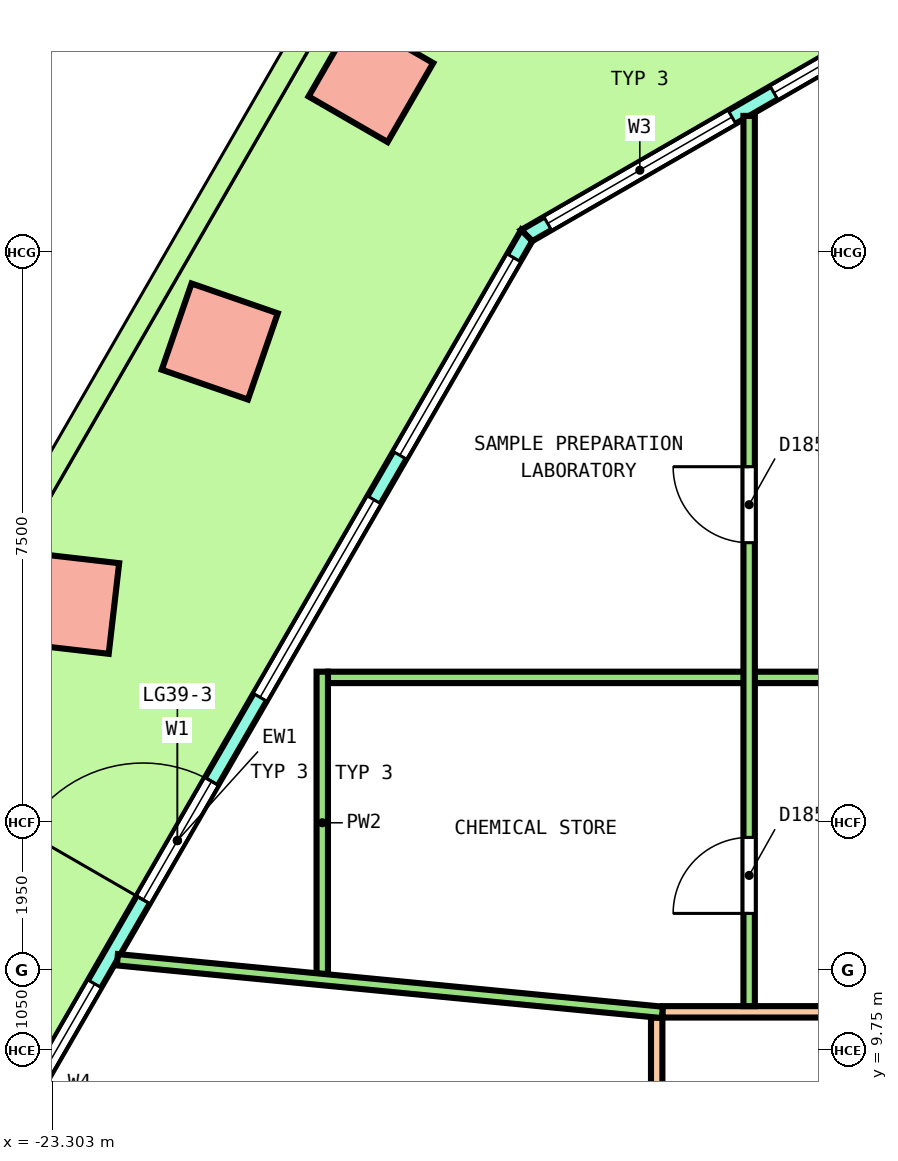
"""IFC4 building model, lengths in metres.
Left out: names, types, materials, properties, quantities, classifications, styles, units other than length and angle.
Written with IfcOpenShell. Run it as: python <this file> out.ifc"""

import sys

from ifc_helpers import new_model, si_unit, direction, frame, frame_2d, origin, origin_2d, place, context, subcontext, project, spatial, polyline, rectangle, outline, extrude, element, fill, save


model = new_model("IFC4")
c1 = context("Model", 3, precision=1e-05, world=origin(), true_north=direction((0.0, 1.0)))
c2 = subcontext(c1, "Body", "Model", "MODEL_VIEW")
j1 = project(units=[si_unit("LENGTHUNIT", "METRE"), si_unit("PLANEANGLEUNIT", "RADIAN")], contexts=[c1])
p1 = place(None, origin())
s1 = spatial("IfcSite", under=j1, at=p1, CompositionType="ELEMENT")
p2 = place(p1, origin())
s2 = spatial("IfcBuilding", under=s1, at=p2, CompositionType="ELEMENT")
p3 = place(p2, frame((0.0, 0.0, 180.4)))
s3 = spatial("IfcBuildingStorey", under=s2, at=p3, CompositionType="ELEMENT", Elevation=180.4)
p4 = place(p3, frame((-19.11, 22.512, 0.0), z_axis=(-0.036205074038, 0.0, 0.999344381389), x_axis=(-0.499425957592, -0.866167613071, -0.018093616283)))
e1 = element("IfcColumn", 1, at=p4, inside=s3, PredefinedType="COLUMN", context=c2, shape_type="SweptSolid", body=[
    extrude(rectangle(XDim=1.2, YDim=1.2, at=origin_2d()), origin(), (0.0, 0.0, 1.0), 4.053),
])
p5 = place(p3, frame((-21.098, 19.069, 0.0), z_axis=(-0.032654174822, 0.006325993277, 0.999446690262), x_axis=(-0.500478631698, -0.865680616164, -0.010872442804)))
e2 = element("IfcColumn", 2, at=p5, inside=s3, PredefinedType="COLUMN", context=c2, shape_type="SweptSolid", body=[
    extrude(rectangle(XDim=1.2, YDim=1.2, at=origin_2d()), origin(), (0.0, 0.0, 1.0), 4.052),
])
p6 = place(p3, frame((-23.087, 15.625, 0.0), z_axis=(-0.028980660531, 0.012532177527, 0.999501408624), x_axis=(-0.499450496938, -0.866334867635, -0.003619147421)))
e3 = element("IfcColumn", 3, at=p6, inside=s3, PredefinedType="COLUMN", context=c2, shape_type="SweptSolid", body=[
    extrude(rectangle(XDim=1.2, YDim=1.2, at=origin_2d()), origin(), (0.0, 0.0, 1.0), 4.052),
])
p7 = place(p3, frame((-11.107, 23.9, 0.0), z_axis=(0.0, 0.0, 1.0), x_axis=(-0.866029458321, -0.49999297727, 0.0)))
e4 = element("IfcWall", 4, at=p7, inside=s3, PredefinedType="SOLIDWALL", context=c2, shape_type="SweptSolid", body=[
    extrude(outline(polyline([(-0.027, -0.1), (1.128, -0.1), (2.282, -0.1), (3.437, -0.1), (4.592, -0.1), (5.747, -0.1), (6.901, -0.1), (6.848, 0.1), (5.711, 0.1), (4.574, 0.1), (3.437, 0.1), (2.301, 0.1), (1.164, 0.1), (0.027, 0.1), (-0.027, -0.1)])), origin(), (0.0, 0.0, 1.0), 4.1),
])
p8 = place(p7, frame((0.319, 0.0, 0.1)))
e5 = element("IfcOpeningElement", 5, at=p8, cuts=e4, PredefinedType="OPENING", context=c2, shape_type="SweptSolid", body=[
    extrude(rectangle(XDim=2.8, YDim=2.9, at=frame_2d((1.4, 1.45))), frame((0.0, 0.11, 0.0), z_axis=(0.0, -1.0, 0.0), x_axis=(1.0, 0.0, 0.0)), (0.0, 0.0, 1.0), 0.22),
])
p9 = place(p7, frame((3.756, 0.0, 0.1)))
e6 = element("IfcOpeningElement", 6, at=p9, cuts=e4, PredefinedType="OPENING", context=c2, shape_type="SweptSolid", body=[
    extrude(rectangle(XDim=2.8, YDim=2.9, at=frame_2d((1.4, 1.45))), frame((0.0, 0.11, 0.0), z_axis=(0.0, -1.0, 0.0), x_axis=(1.0, 0.0, 0.0)), (0.0, 0.0, 1.0), 0.22),
])
p10 = place(p3, frame((-17.061, 20.463, 0.0), z_axis=(0.0, 0.0, 1.0), x_axis=(-0.499998761798, -0.866026118659, 0.0)))
e7 = element("IfcWall", 7, at=p10, inside=s3, PredefinedType="SOLIDWALL", context=c2, shape_type="SweptSolid", body=[
    extrude(outline(polyline([(-0.027, -0.1), (0.997, -0.1), (2.021, -0.1), (3.046, -0.1), (4.07, -0.1), (5.094, -0.1), (6.118, -0.1), (7.143, -0.1), (8.167, -0.1), (9.191, -0.1), (10.215, -0.1), (11.239, -0.1), (12.263, -0.1), (13.288, -0.1), (14.312, -0.1), (15.336, -0.1), (16.36, -0.1), (17.385, -0.1), (18.409, -0.1), (18.355, 0.1), (17.337, 0.1), (16.319, 0.1), (15.3, 0.1), (14.282, 0.1), (13.264, 0.1), (12.246, 0.1), (11.227, 0.1), (10.209, 0.1), (9.191, 0.1), (8.173, 0.1), (7.155, 0.1), (6.136, 0.1), (5.118, 0.1), (4.1, 0.1), (3.082, 0.1), (2.063, 0.1), (1.045, 0.1), (0.027, 0.1), (-0.027, -0.1)])), origin(), (0.0, 0.0, 1.0), 4.1),
])
p11 = place(p10, frame((0.338, 0.0, 0.1)))
e8 = element("IfcOpeningElement", 8, at=p11, cuts=e7, PredefinedType="OPENING", context=c2, shape_type="SweptSolid", body=[
    extrude(rectangle(XDim=3.0, YDim=2.9, at=frame_2d((1.5, 1.45))), frame((0.0, 0.11, 0.0), z_axis=(0.0, -1.0, 0.0), x_axis=(1.0, 0.0, 0.0)), (0.0, 0.0, 1.0), 0.22),
])
p12 = place(p10, frame((4.015, 0.0, 0.1)))
e9 = element("IfcOpeningElement", 9, at=p12, cuts=e7, PredefinedType="OPENING", context=c2, shape_type="SweptSolid", body=[
    extrude(rectangle(XDim=3.0, YDim=2.9, at=frame_2d((1.5, 1.45))), frame((0.0, 0.11, 0.0), z_axis=(0.0, -1.0, 0.0), x_axis=(1.0, 0.0, 0.0)), (0.0, 0.0, 1.0), 0.22),
])
p13 = place(p10, frame((8.291, 0.0, 0.0)))
e10 = element("IfcOpeningElement", 10, at=p13, cuts=e7, PredefinedType="OPENING", context=c2, shape_type="SweptSolid", body=[
    extrude(rectangle(XDim=1.8, YDim=2.4, at=frame_2d((0.9, 1.2))), frame((0.0, 0.11, 0.0), z_axis=(0.0, -1.0, 0.0), x_axis=(1.0, 0.0, 0.0)), (0.0, 0.0, 1.0), 0.22),
])
p14 = place(p10, frame((8.291, 0.0, 2.55)))
e11 = element("IfcOpeningElement", 11, at=p14, cuts=e7, PredefinedType="OPENING", context=c2, shape_type="SweptSolid", body=[
    extrude(rectangle(XDim=1.8, YDim=0.45, at=frame_2d((0.9, 0.225))), frame((0.0, 0.11, 0.0), z_axis=(0.0, -1.0, 0.0), x_axis=(1.0, 0.0, 0.0)), (0.0, 0.0, 1.0), 0.22),
])
p15 = place(p10, frame((11.367, 0.0, 0.1)))
e12 = element("IfcOpeningElement", 12, at=p15, cuts=e7, PredefinedType="OPENING", context=c2, shape_type="SweptSolid", body=[
    extrude(rectangle(XDim=3.0, YDim=2.9, at=frame_2d((1.5, 1.45))), frame((0.0, 0.11, 0.0), z_axis=(0.0, -1.0, 0.0), x_axis=(1.0, 0.0, 0.0)), (0.0, 0.0, 1.0), 0.22),
])
p16 = place(p10, frame((15.044, 0.0, 0.1)))
e13 = element("IfcOpeningElement", 13, at=p16, cuts=e7, PredefinedType="OPENING", context=c2, shape_type="SweptSolid", body=[
    extrude(rectangle(XDim=3.0, YDim=2.9, at=frame_2d((1.5, 1.45))), frame((0.0, 0.11, 0.0), z_axis=(0.0, -1.0, 0.0), x_axis=(1.0, 0.0, 0.0)), (0.0, 0.0, 1.0), 0.22),
])
p17 = place(p3, frame((-15.275, 10.25, 0.0), z_axis=(0.0, 0.0, 1.0), x_axis=(1.0, 0.0, 0.0)))
e14 = element("IfcWall", 14, at=p17, inside=s3, PredefinedType="PARTITIONING", context=c2, shape_type="SweptSolid", body=[
    extrude(rectangle(XDim=30.55, YDim=0.15, at=frame_2d((15.275, 0.0))), origin(), (0.0, 0.0, 1.0), 3.05),
])
p18 = place(p17, frame((26.836, 0.0, 0.0)))
e15 = element("IfcOpeningElement", 15, at=p18, cuts=e14, PredefinedType="OPENING", context=c2, shape_type="SweptSolid", body=[
    extrude(rectangle(XDim=1.0, YDim=2.1, at=frame_2d((0.5, 1.05))), frame((0.0, 0.085, 0.0), z_axis=(0.0, -1.0, 0.0), x_axis=(1.0, 0.0, 0.0)), (0.0, 0.0, 1.0), 0.17),
])
p19 = place(p17, frame((13.785, 0.0, 0.0)))
e16 = element("IfcOpeningElement", 16, at=p19, cuts=e14, PredefinedType="OPENING", context=c2, shape_type="SweptSolid", body=[
    extrude(rectangle(XDim=1.2, YDim=2.1, at=frame_2d((0.6, 1.05))), frame((0.0, 0.085, 0.0), z_axis=(0.0, -1.0, 0.0), x_axis=(1.0, 0.0, 0.0)), (0.0, 0.0, 1.0), 0.17),
])
p20 = place(p3, frame((-15.35, 0.399, 0.0), z_axis=(0.0, 0.0, 1.0), x_axis=(0.0, 1.0, 0.0)))
e17 = element("IfcWall", 17, at=p20, inside=s3, PredefinedType="PARTITIONING", context=c2, shape_type="SweptSolid", body=[
    extrude(rectangle(XDim=9.776, YDim=0.15, at=frame_2d((4.888, 0.0))), origin(), (0.0, 0.0, 1.0), 3.05),
])
p21 = place(p3, frame((-19.675, 14.65, 0.0), z_axis=(0.0, 0.0, 1.0), x_axis=(1.0, 0.0, 0.0)))
e18 = element("IfcWall", 18, at=p21, inside=s3, PredefinedType="PARTITIONING", context=c2, shape_type="SweptSolid", body=[
    extrude(rectangle(XDim=39.5, YDim=0.15, at=frame_2d((19.75, 0.0))), origin(), (0.0, 0.0, 1.0), 3.05),
])
p22 = place(p21, frame((30.472, 0.0, 0.0)))
e19 = element("IfcOpeningElement", 19, at=p22, cuts=e18, PredefinedType="OPENING", context=c2, shape_type="SweptSolid", body=[
    extrude(rectangle(XDim=1.2, YDim=2.1, at=frame_2d((0.6, 1.05))), frame((0.0, 0.085, 0.0), z_axis=(0.0, -1.0, 0.0), x_axis=(1.0, 0.0, 0.0)), (0.0, 0.0, 1.0), 0.17),
])
p23 = place(p3, frame((-14.134, 10.325, 0.0), z_axis=(0.0, 0.0, 1.0), x_axis=(0.0, 1.0, 0.0)))
e20 = element("IfcWall", 20, at=p23, inside=s3, PredefinedType="PARTITIONING", context=c2, shape_type="SweptSolid", body=[
    extrude(rectangle(XDim=11.712, YDim=0.15, at=frame_2d((5.856, 0.0))), origin(), (0.0, 0.0, 1.0), 3.05),
])
p24 = place(p23, frame((6.097, 0.0, 0.0)))
e21 = element("IfcOpeningElement", 21, at=p24, cuts=e20, PredefinedType="OPENING", context=c2, shape_type="SweptSolid", body=[
    extrude(rectangle(XDim=1.0, YDim=2.1, at=frame_2d((0.5, 1.05))), frame((0.0, 0.085, 0.0), z_axis=(0.0, -1.0, 0.0), x_axis=(1.0, 0.0, 0.0)), (0.0, 0.0, 1.0), 0.17),
])
p25 = place(p23, frame((1.22, 0.0, 0.0)))
e22 = element("IfcOpeningElement", 22, at=p25, cuts=e20, PredefinedType="OPENING", context=c2, shape_type="SweptSolid", body=[
    extrude(rectangle(XDim=1.0, YDim=2.1, at=frame_2d((0.5, 1.05))), frame((0.0, 0.085, 0.0), z_axis=(0.0, -1.0, 0.0), x_axis=(1.0, 0.0, 0.0)), (0.0, 0.0, 1.0), 0.17),
])
p26 = place(p3, frame((-19.75, 10.75, 0.0), z_axis=(0.0, 0.0, 1.0), x_axis=(0.0, 1.0, 0.0)))
e23 = element("IfcWall", 23, at=p26, inside=s3, PredefinedType="PARTITIONING", context=c2, shape_type="SweptSolid", body=[
    extrude(rectangle(XDim=3.975, YDim=0.15, at=frame_2d((1.988, 0.0))), origin(), (0.0, 0.0, 1.0), 3.05),
])
p27 = place(p3, frame((-22.446, 10.935, 0.0), z_axis=(0.0, 0.0, 1.0), x_axis=(0.995370012711, -0.096117312678, 0.0)))
e24 = element("IfcWall", 24, at=p27, inside=s3, PredefinedType="PARTITIONING", context=c2, shape_type="SweptSolid", body=[
    extrude(rectangle(XDim=7.204, YDim=0.15, at=frame_2d((3.602, 0.0))), origin(), (0.0, 0.0, 1.0), 3.05),
])
p28 = place(p8, origin())
e25 = element("IfcWindow", 25, at=p28, inside=s3, PartitioningType="SINGLE_PANEL", PredefinedType="WINDOW", context=c2, shape_type="SweptSolid", body=[
    extrude(rectangle(XDim=2.8, YDim=2.9, at=frame_2d((1.4, 1.45))), frame((0.0, 0.03, 0.0), z_axis=(0.0, -1.0, 0.0), x_axis=(1.0, 0.0, 0.0)), (0.0, 0.0, 1.0), 0.06),
])
fill(e5, e25)
p29 = place(p9, origin())
e26 = element("IfcWindow", 26, at=p29, inside=s3, PartitioningType="SINGLE_PANEL", PredefinedType="WINDOW", context=c2, shape_type="SweptSolid", body=[
    extrude(rectangle(XDim=2.8, YDim=2.9, at=frame_2d((1.4, 1.45))), frame((0.0, 0.03, 0.0), z_axis=(0.0, -1.0, 0.0), x_axis=(1.0, 0.0, 0.0)), (0.0, 0.0, 1.0), 0.06),
])
fill(e6, e26)
p30 = place(p11, origin())
e27 = element("IfcWindow", 27, at=p30, inside=s3, PartitioningType="SINGLE_PANEL", PredefinedType="WINDOW", context=c2, shape_type="SweptSolid", body=[
    extrude(rectangle(XDim=3.0, YDim=2.9, at=frame_2d((1.5, 1.45))), frame((0.0, 0.03, 0.0), z_axis=(0.0, -1.0, 0.0), x_axis=(1.0, 0.0, 0.0)), (0.0, 0.0, 1.0), 0.06),
])
fill(e8, e27)
p31 = place(p12, origin())
e28 = element("IfcWindow", 28, at=p31, inside=s3, PartitioningType="SINGLE_PANEL", PredefinedType="WINDOW", context=c2, shape_type="SweptSolid", body=[
    extrude(rectangle(XDim=3.0, YDim=2.9, at=frame_2d((1.5, 1.45))), frame((0.0, 0.03, 0.0), z_axis=(0.0, -1.0, 0.0), x_axis=(1.0, 0.0, 0.0)), (0.0, 0.0, 1.0), 0.06),
])
fill(e9, e28)
p32 = place(p13, origin())
e29 = element("IfcDoor", 29, at=p32, inside=s3, OperationType="DOUBLE_DOOR_SINGLE_SWING", PredefinedType="DOOR", context=c2, shape_type="SweptSolid", body=[
    extrude(rectangle(XDim=1.8, YDim=2.4, at=frame_2d((0.9, 1.2))), frame((0.0, 0.025, 0.0), z_axis=(0.0, -1.0, 0.0), x_axis=(1.0, 0.0, 0.0)), (0.0, 0.0, 1.0), 0.05),
])
fill(e10, e29)
p33 = place(p14, origin())
e30 = element("IfcWindow", 30, at=p33, inside=s3, PartitioningType="SINGLE_PANEL", PredefinedType="WINDOW", context=c2, shape_type="SweptSolid", body=[
    extrude(rectangle(XDim=1.8, YDim=0.45, at=frame_2d((0.9, 0.225))), frame((0.0, 0.03, 0.0), z_axis=(0.0, -1.0, 0.0), x_axis=(1.0, 0.0, 0.0)), (0.0, 0.0, 1.0), 0.06),
])
fill(e11, e30)
p34 = place(p15, origin())
e31 = element("IfcWindow", 31, at=p34, inside=s3, PartitioningType="SINGLE_PANEL", PredefinedType="WINDOW", context=c2, shape_type="SweptSolid", body=[
    extrude(rectangle(XDim=3.0, YDim=2.9, at=frame_2d((1.5, 1.45))), frame((0.0, 0.03, 0.0), z_axis=(0.0, -1.0, 0.0), x_axis=(1.0, 0.0, 0.0)), (0.0, 0.0, 1.0), 0.06),
])
fill(e12, e31)
p35 = place(p24, origin())
e32 = element("IfcDoor", 32, at=p35, inside=s3, OperationType="SINGLE_SWING_RIGHT", PredefinedType="DOOR", context=c2, shape_type="SweptSolid", body=[
    extrude(rectangle(XDim=1.0, YDim=2.1, at=frame_2d((0.5, 1.05))), frame((0.0, 0.025, 0.0), z_axis=(0.0, -1.0, 0.0), x_axis=(1.0, 0.0, 0.0)), (0.0, 0.0, 1.0), 0.05),
])
fill(e21, e32)
p36 = place(p25, origin())
e33 = element("IfcDoor", 33, at=p36, inside=s3, OperationType="SINGLE_SWING_RIGHT", PredefinedType="DOOR", context=c2, shape_type="SweptSolid", body=[
    extrude(rectangle(XDim=1.0, YDim=2.1, at=frame_2d((0.5, 1.05))), frame((0.0, 0.025, 0.0), z_axis=(0.0, -1.0, 0.0), x_axis=(1.0, 0.0, 0.0)), (0.0, 0.0, 1.0), 0.05),
])
fill(e22, e33)
save(model, sys.argv[1])
